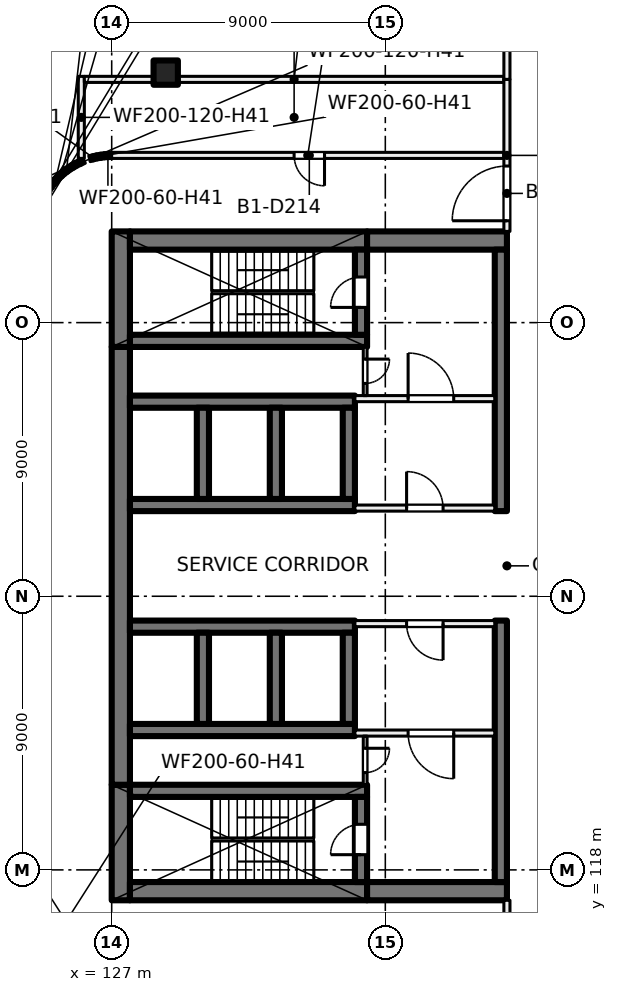
"""IFC4 building model, lengths in metres.
Left out: names, types, materials, properties, quantities, classifications, styles, units other than length and angle.
Written with IfcOpenShell. Run it as: python <this file> out.ifc"""

import sys

from ifc_helpers import new_model, si_unit, direction, frame, frame_2d, origin, origin_2d, place, context, subcontext, project, spatial, rectangle, extrude, element, fill, save


model = new_model("IFC4")
c1 = context("Model", 3, precision=1e-05, world=origin(), true_north=direction((0.0, 1.0)))
c2 = subcontext(c1, "Body", "Model", "MODEL_VIEW")
j1 = project(units=[si_unit("LENGTHUNIT", "METRE"), si_unit("PLANEANGLEUNIT", "RADIAN")], contexts=[c1])
p1 = place(None, origin())
s1 = spatial("IfcSite", under=j1, at=p1, CompositionType="ELEMENT")
p2 = place(p1, origin())
s2 = spatial("IfcBuilding", under=s1, at=p2, CompositionType="ELEMENT")
p3 = place(p2, frame((0.0, 0.0, -4.5)))
s3 = spatial("IfcBuildingStorey", under=s2, at=p3, CompositionType="ELEMENT", Elevation=-4.5)
p4 = place(p3, frame((128.777, 144.223, 0.0), z_axis=(0.0, 0.0, 1.0), x_axis=(1.0, 0.0, 0.0)))
e1 = element("IfcColumn", 1, at=p4, inside=s3, PredefinedType="COLUMN", context=c2, shape_type="SweptSolid", body=[
    extrude(rectangle(XDim=0.8, YDim=0.8, at=origin_2d()), origin(), (0.0, 0.0, 1.0), 4.5),
])
p5 = place(p3, frame((127.3, 117.0, 0.0), z_axis=(0.0, 0.0, 1.0), x_axis=(0.0, 1.0, 0.0)))
e2 = element("IfcWall", 2, at=p5, inside=s3, PredefinedType="SHEAR", context=c2, shape_type="SweptSolid", body=[
    extrude(rectangle(XDim=3.8, YDim=0.6, at=frame_2d((1.9, 0.0))), origin(), (0.0, 0.0, 1.0), 4.5),
])
p6 = place(p3, frame((127.3, 120.8, 0.0), z_axis=(0.0, 0.0, 1.0), x_axis=(0.0, 1.0, 0.0)))
e3 = element("IfcWall", 3, at=p6, inside=s3, PredefinedType="SHEAR", context=c2, shape_type="SweptSolid", body=[
    extrude(rectangle(XDim=14.4, YDim=0.6, at=frame_2d((7.2, 0.0))), origin(), (0.0, 0.0, 1.0), 4.5),
])
p7 = place(p3, frame((127.3, 135.2, 0.0), z_axis=(0.0, 0.0, 1.0), x_axis=(0.0, 1.0, 0.0)))
e4 = element("IfcWall", 4, at=p7, inside=s3, PredefinedType="SHEAR", context=c2, shape_type="SweptSolid", body=[
    extrude(rectangle(XDim=3.8, YDim=0.6, at=frame_2d((1.9, 0.0))), origin(), (0.0, 0.0, 1.0), 4.5),
])
for number, where, z_axis, x_axis in (
    (5, (127.6, 117.3, 0.0), (0.0, 0.0, 1.0), (1.0, 0.0, 0.0)),
    (6, (127.6, 138.7, 0.0), (0.0, 0.0, 1.0), (1.0, 0.0, 0.0)),
):
    element("IfcWall", number, at=place(p3, frame(where, z_axis=z_axis, x_axis=x_axis)), inside=s3, PredefinedType="SHEAR", context=c2, shape_type="SweptSolid", body=[
        extrude(rectangle(XDim=7.8, YDim=0.6, at=frame_2d((3.9, 0.0))), origin(), (0.0, 0.0, 1.0), 4.5),
    ])
for number, where, z_axis, x_axis in (
    (7, (135.4, 117.3, 0.0), (0.0, 0.0, 1.0), (1.0, 0.0, 0.0)),
    (8, (135.4, 138.7, 0.0), (0.0, 0.0, 1.0), (1.0, 0.0, 0.0)),
):
    element("IfcWall", number, at=place(p3, frame(where, z_axis=z_axis, x_axis=x_axis)), inside=s3, PredefinedType="SHEAR", context=c2, shape_type="SweptSolid", body=[
        extrude(rectangle(XDim=4.6, YDim=0.6, at=frame_2d((2.3, 0.0))), origin(), (0.0, 0.0, 1.0), 4.5),
    ])
p8 = place(p3, frame((127.6, 120.6, 0.0), z_axis=(0.0, 0.0, 1.0), x_axis=(1.0, 0.0, 0.0)))
e9 = element("IfcWall", 9, at=p8, inside=s3, PredefinedType="SHEAR", context=c2, shape_type="SweptSolid", body=[
    extrude(rectangle(XDim=7.8, YDim=0.4, at=frame_2d((3.9, 0.0))), origin(), (0.0, 0.0, 1.0), 4.5),
])
p9 = place(p3, frame((135.2, 117.6, 0.0), z_axis=(0.0, 0.0, 1.0), x_axis=(0.0, 1.0, 0.0)))
e10 = element("IfcWall", 10, at=p9, inside=s3, PredefinedType="SHEAR", context=c2, shape_type="SweptSolid", body=[
    extrude(rectangle(XDim=2.8, YDim=0.4, at=frame_2d((1.4, 0.0))), origin(), (0.0, 0.0, 1.0), 4.5),
])
p10 = place(p9, frame((0.9, 0.0, 0.0)))
e11 = element("IfcOpeningElement", 11, at=p10, cuts=e10, PredefinedType="OPENING", context=c2, shape_type="SweptSolid", body=[
    extrude(rectangle(XDim=1.0, YDim=2.1, at=frame_2d((0.5, 1.05))), frame((0.0, 0.21, 0.0), z_axis=(0.0, -1.0, 0.0), x_axis=(1.0, 0.0, 0.0)), (0.0, 0.0, 1.0), 0.42),
])
p11 = place(p3, frame((127.6, 135.4, 0.0), z_axis=(0.0, 0.0, 1.0), x_axis=(1.0, 0.0, 0.0)))
e12 = element("IfcWall", 12, at=p11, inside=s3, PredefinedType="SHEAR", context=c2, shape_type="SweptSolid", body=[
    extrude(rectangle(XDim=7.8, YDim=0.4, at=frame_2d((3.9, 0.0))), origin(), (0.0, 0.0, 1.0), 4.5),
])
p12 = place(p3, frame((135.2, 135.6, 0.0), z_axis=(0.0, 0.0, 1.0), x_axis=(0.0, 1.0, 0.0)))
e13 = element("IfcWall", 13, at=p12, inside=s3, PredefinedType="SHEAR", context=c2, shape_type="SweptSolid", body=[
    extrude(rectangle(XDim=2.8, YDim=0.4, at=frame_2d((1.4, 0.0))), origin(), (0.0, 0.0, 1.0), 4.5),
])
p13 = place(p12, frame((0.9, 0.0, 0.0)))
e14 = element("IfcOpeningElement", 14, at=p13, cuts=e13, PredefinedType="OPENING", context=c2, shape_type="SweptSolid", body=[
    extrude(rectangle(XDim=1.0, YDim=2.1, at=frame_2d((0.5, 1.05))), frame((0.0, 0.21, 0.0), z_axis=(0.0, -1.0, 0.0), x_axis=(1.0, 0.0, 0.0)), (0.0, 0.0, 1.0), 0.42),
])
for number, where, z_axis, x_axis in (
    (15, (127.6, 126.0, 0.0), (0.0, 0.0, 1.0), (1.0, 0.0, 0.0)),
    (16, (127.6, 122.6, 0.0), (0.0, 0.0, 1.0), (1.0, 0.0, 0.0)),
):
    element("IfcWall", number, at=place(p3, frame(where, z_axis=z_axis, x_axis=x_axis)), inside=s3, PredefinedType="SHEAR", context=c2, shape_type="SweptSolid", body=[
        extrude(rectangle(XDim=7.4, YDim=0.4, at=frame_2d((3.7, 0.0))), origin(), (0.0, 0.0, 1.0), 4.5),
    ])
for number, where, z_axis, x_axis in (
    (17, (130.0, 122.8, 0.0), (0.0, 0.0, 1.0), (0.0, 1.0, 0.0)),
    (18, (132.4, 122.8, 0.0), (0.0, 0.0, 1.0), (0.0, 1.0, 0.0)),
    (19, (134.8, 122.8, 0.0), (0.0, 0.0, 1.0), (0.0, 1.0, 0.0)),
):
    element("IfcWall", number, at=place(p3, frame(where, z_axis=z_axis, x_axis=x_axis)), inside=s3, PredefinedType="SHEAR", context=c2, shape_type="SweptSolid", body=[
        extrude(rectangle(XDim=3.0, YDim=0.4, at=frame_2d((1.5, 0.0))), origin(), (0.0, 0.0, 1.0), 4.5),
    ])
for number, where, z_axis, x_axis in (
    (20, (127.6, 130.0, 0.0), (0.0, 0.0, 1.0), (1.0, 0.0, 0.0)),
    (21, (127.6, 133.4, 0.0), (0.0, 0.0, 1.0), (1.0, 0.0, 0.0)),
):
    element("IfcWall", number, at=place(p3, frame(where, z_axis=z_axis, x_axis=x_axis)), inside=s3, PredefinedType="SHEAR", context=c2, shape_type="SweptSolid", body=[
        extrude(rectangle(XDim=7.4, YDim=0.4, at=frame_2d((3.7, 0.0))), origin(), (0.0, 0.0, 1.0), 4.5),
    ])
for number, where, z_axis, x_axis in (
    (22, (130.0, 130.2, 0.0), (0.0, 0.0, 1.0), (0.0, 1.0, 0.0)),
    (23, (132.4, 130.2, 0.0), (0.0, 0.0, 1.0), (0.0, 1.0, 0.0)),
    (24, (134.8, 130.2, 0.0), (0.0, 0.0, 1.0), (0.0, 1.0, 0.0)),
):
    element("IfcWall", number, at=place(p3, frame(where, z_axis=z_axis, x_axis=x_axis)), inside=s3, PredefinedType="SHEAR", context=c2, shape_type="SweptSolid", body=[
        extrude(rectangle(XDim=3.0, YDim=0.4, at=frame_2d((1.5, 0.0))), origin(), (0.0, 0.0, 1.0), 4.5),
    ])
for number, where, z_axis, x_axis in (
    (25, (139.8, 117.6, 0.0), (0.0, 0.0, 1.0), (0.0, 1.0, 0.0)),
    (26, (139.8, 129.8, 0.0), (0.0, 0.0, 1.0), (0.0, 1.0, 0.0)),
):
    element("IfcWall", number, at=place(p3, frame(where, z_axis=z_axis, x_axis=x_axis)), inside=s3, PredefinedType="SHEAR", context=c2, shape_type="SweptSolid", body=[
        extrude(rectangle(XDim=8.6, YDim=0.4, at=frame_2d((4.3, 0.0))), origin(), (0.0, 0.0, 1.0), 4.5),
    ])
p14 = place(p3, frame((135.0, 129.9, 0.0), z_axis=(0.0, 0.0, 1.0), x_axis=(1.0, 0.0, 0.0)))
e27 = element("IfcWall", 27, at=p14, inside=s3, PredefinedType="PARTITIONING", context=c2, shape_type="SweptSolid", body=[
    extrude(rectangle(XDim=4.6, YDim=0.2, at=frame_2d((2.3, 0.0))), origin(), (0.0, 0.0, 1.0), 4.1),
])
p15 = place(p14, frame((1.7, 0.0, 0.0)))
e28 = element("IfcOpeningElement", 28, at=p15, cuts=e27, PredefinedType="OPENING", context=c2, shape_type="SweptSolid", body=[
    extrude(rectangle(XDim=1.2, YDim=2.1, at=frame_2d((0.6, 1.05))), frame((0.0, 0.11, 0.0), z_axis=(0.0, -1.0, 0.0), x_axis=(1.0, 0.0, 0.0)), (0.0, 0.0, 1.0), 0.22),
])
p16 = place(p3, frame((135.0, 133.5, 0.0), z_axis=(0.0, 0.0, 1.0), x_axis=(1.0, 0.0, 0.0)))
e29 = element("IfcWall", 29, at=p16, inside=s3, PredefinedType="PARTITIONING", context=c2, shape_type="SweptSolid", body=[
    extrude(rectangle(XDim=4.6, YDim=0.2, at=frame_2d((2.3, 0.0))), origin(), (0.0, 0.0, 1.0), 4.1),
])
p17 = place(p16, frame((1.75, 0.0, 0.0)))
e30 = element("IfcOpeningElement", 30, at=p17, cuts=e29, PredefinedType="OPENING", context=c2, shape_type="SweptSolid", body=[
    extrude(rectangle(XDim=1.5, YDim=2.1, at=frame_2d((0.75, 1.05))), frame((0.0, 0.11, 0.0), z_axis=(0.0, -1.0, 0.0), x_axis=(1.0, 0.0, 0.0)), (0.0, 0.0, 1.0), 0.22),
])
p18 = place(p3, frame((135.337, 135.2, 0.0), z_axis=(0.0, 0.0, 1.0), x_axis=(0.0, -1.0, 0.0)))
e31 = element("IfcWall", 31, at=p18, inside=s3, PredefinedType="PARTITIONING", context=c2, shape_type="SweptSolid", body=[
    extrude(rectangle(XDim=1.6, YDim=0.125, at=frame_2d((0.8, 0.0))), origin(), (0.0, 0.0, 1.0), 4.1),
])
p19 = place(p18, frame((0.4, 0.0, 0.0)))
e32 = element("IfcOpeningElement", 32, at=p19, cuts=e31, PredefinedType="OPENING", context=c2, shape_type="SweptSolid", body=[
    extrude(rectangle(XDim=0.8, YDim=2.1, at=frame_2d((0.4, 1.05))), frame((0.0, 0.073, 0.0), z_axis=(0.0, -1.0, 0.0), x_axis=(1.0, 0.0, 0.0)), (0.0, 0.0, 1.0), 0.145),
])
p20 = place(p3, frame((139.6, 126.1, 0.0), z_axis=(0.0, 0.0, 1.0), x_axis=(-1.0, 0.0, 0.0)))
e33 = element("IfcWall", 33, at=p20, inside=s3, PredefinedType="PARTITIONING", context=c2, shape_type="SweptSolid", body=[
    extrude(rectangle(XDim=4.6, YDim=0.2, at=frame_2d((2.3, 0.0))), origin(), (0.0, 0.0, 1.0), 4.1),
])
p21 = place(p20, frame((1.7, 0.0, 0.0)))
e34 = element("IfcOpeningElement", 34, at=p21, cuts=e33, PredefinedType="OPENING", context=c2, shape_type="SweptSolid", body=[
    extrude(rectangle(XDim=1.2, YDim=2.1, at=frame_2d((0.6, 1.05))), frame((0.0, 0.11, 0.0), z_axis=(0.0, -1.0, 0.0), x_axis=(1.0, 0.0, 0.0)), (0.0, 0.0, 1.0), 0.22),
])
p22 = place(p3, frame((139.6, 122.5, 0.0), z_axis=(0.0, 0.0, 1.0), x_axis=(-1.0, 0.0, 0.0)))
e35 = element("IfcWall", 35, at=p22, inside=s3, PredefinedType="PARTITIONING", context=c2, shape_type="SweptSolid", body=[
    extrude(rectangle(XDim=4.6, YDim=0.2, at=frame_2d((2.3, 0.0))), origin(), (0.0, 0.0, 1.0), 4.1),
])
p23 = place(p22, frame((1.35, 0.0, 0.0)))
e36 = element("IfcOpeningElement", 36, at=p23, cuts=e35, PredefinedType="OPENING", context=c2, shape_type="SweptSolid", body=[
    extrude(rectangle(XDim=1.5, YDim=2.1, at=frame_2d((0.75, 1.05))), frame((0.0, 0.11, 0.0), z_axis=(0.0, -1.0, 0.0), x_axis=(1.0, 0.0, 0.0)), (0.0, 0.0, 1.0), 0.22),
])
p24 = place(p3, frame((135.337, 122.4, 0.0), z_axis=(0.0, 0.0, 1.0), x_axis=(0.0, -1.0, 0.0)))
e37 = element("IfcWall", 37, at=p24, inside=s3, PredefinedType="PARTITIONING", context=c2, shape_type="SweptSolid", body=[
    extrude(rectangle(XDim=1.6, YDim=0.125, at=frame_2d((0.8, 0.0))), origin(), (0.0, 0.0, 1.0), 4.1),
])
p25 = place(p24, frame((0.4, 0.0, 0.0)))
e38 = element("IfcOpeningElement", 38, at=p25, cuts=e37, PredefinedType="OPENING", context=c2, shape_type="SweptSolid", body=[
    extrude(rectangle(XDim=0.8, YDim=2.1, at=frame_2d((0.4, 1.05))), frame((0.0, 0.073, 0.0), z_axis=(0.0, -1.0, 0.0), x_axis=(1.0, 0.0, 0.0)), (0.0, 0.0, 1.0), 0.145),
])
p26 = place(p3, frame((124.918, 140.385, 0.0), z_axis=(0.0, 0.0, 1.0), x_axis=(0.595707657713, 0.803201336243, 0.0)))
e39 = element("IfcWall", 39, at=p26, inside=s3, PredefinedType="PARTITIONING", context=c2, shape_type="SweptSolid", body=[
    extrude(rectangle(XDim=0.255, YDim=0.2, at=frame_2d((0.128, 0.0))), origin(), (0.0, 0.0, 1.0), 4.1),
])
for number, where, z_axis, x_axis in (
    (40, (125.064, 140.582, 0.0), (0.0, 0.0, 1.0), (0.669, 0.743, 0.0)),
    (41, (125.228, 140.765, 0.0), (0.0, 0.0, 1.0), (0.743, 0.669, 0.0)),
):
    element("IfcWall", number, at=place(p3, frame(where, z_axis=z_axis, x_axis=x_axis)), inside=s3, PredefinedType="PARTITIONING", context=c2, shape_type="SweptSolid", body=[
        extrude(rectangle(XDim=0.256, YDim=0.2, at=frame_2d((0.128, 0.0))), origin(), (0.0, 0.0, 1.0), 4.1),
    ])
p27 = place(p3, frame((125.41, 140.93, 0.0), z_axis=(0.0, 0.0, 1.0), x_axis=(0.803201336243, 0.595707657713, 0.0)))
e42 = element("IfcWall", 42, at=p27, inside=s3, PredefinedType="PARTITIONING", context=c2, shape_type="SweptSolid", body=[
    extrude(rectangle(XDim=0.255, YDim=0.2, at=frame_2d((0.128, 0.0))), origin(), (0.0, 0.0, 1.0), 4.1),
])
p28 = place(p3, frame((125.607, 141.076, 0.0), z_axis=(0.0, 0.0, 1.0), x_axis=(0.857998903579, 0.513651517527, 0.0)))
e43 = element("IfcWall", 43, at=p28, inside=s3, PredefinedType="PARTITIONING", context=c2, shape_type="SweptSolid", body=[
    extrude(rectangle(XDim=0.255, YDim=0.2, at=frame_2d((0.127, 0.0))), origin(), (0.0, 0.0, 1.0), 4.1),
])
p29 = place(p3, frame((125.818, 141.203, 0.0), z_axis=(0.0, 0.0, 1.0), x_axis=(0.902065692634, 0.431598755991, 0.0)))
e44 = element("IfcWall", 44, at=p29, inside=s3, PredefinedType="PARTITIONING", context=c2, shape_type="SweptSolid", body=[
    extrude(rectangle(XDim=0.302, YDim=0.2, at=frame_2d((0.151, 0.0))), origin(), (0.0, 0.0, 1.0), 4.1),
])
p30 = place(p3, frame((126.0, 141.401, 0.0), z_axis=(0.0, 0.0, 1.0), x_axis=(0.0, 1.0, 0.0)))
e45 = element("IfcWall", 45, at=p30, inside=s3, PredefinedType="PARTITIONING", context=c2, shape_type="SweptSolid", body=[
    extrude(rectangle(XDim=2.699, YDim=0.2, at=frame_2d((1.35, 0.0))), origin(), (0.0, 0.0, 1.0), 4.1),
])
p31 = place(p3, frame((126.1, 144.0, 0.0), z_axis=(0.0, 0.0, 1.0), x_axis=(1.0, 0.0, 0.0)))
e46 = element("IfcWall", 46, at=p31, inside=s3, PredefinedType="PARTITIONING", context=c2, shape_type="SweptSolid", body=[
    extrude(rectangle(XDim=13.8, YDim=0.2, at=frame_2d((6.9, 0.0))), origin(), (0.0, 0.0, 1.0), 4.1),
])
p32 = place(p3, frame((126.269, 141.391, 0.0), z_axis=(0.0, 0.0, 1.0), x_axis=(0.970366809683, 0.241636616978, 0.0)))
e47 = element("IfcWall", 47, at=p32, inside=s3, PredefinedType="PARTITIONING", context=c2, shape_type="SweptSolid", body=[
    extrude(rectangle(XDim=0.256, YDim=0.2, at=frame_2d((0.128, 0.0))), origin(), (0.0, 0.0, 1.0), 4.1),
])
p33 = place(p3, frame((126.507, 141.451, 0.0), z_axis=(0.0, 0.0, 1.0), x_axis=(0.988852180426, 0.148900521377, 0.0)))
e48 = element("IfcWall", 48, at=p33, inside=s3, PredefinedType="PARTITIONING", context=c2, shape_type="SweptSolid", body=[
    extrude(rectangle(XDim=0.256, YDim=0.2, at=frame_2d((0.128, 0.0))), origin(), (0.0, 0.0, 1.0), 4.1),
])
p34 = place(p3, frame((126.75, 141.488, 0.0), z_axis=(0.0, 0.0, 1.0), x_axis=(0.998874697667, 0.047427190102, 0.0)))
e49 = element("IfcWall", 49, at=p34, inside=s3, PredefinedType="PARTITIONING", context=c2, shape_type="SweptSolid", body=[
    extrude(rectangle(XDim=0.252, YDim=0.2, at=frame_2d((0.126, 0.0))), origin(), (0.0, 0.0, 1.0), 4.1),
])
p35 = place(p3, frame((126.998, 141.5, 0.0), z_axis=(0.0, 0.0, 1.0), x_axis=(1.0, 0.0, 0.0)))
e50 = element("IfcWall", 50, at=p35, inside=s3, PredefinedType="PARTITIONING", context=c2, shape_type="SweptSolid", body=[
    extrude(rectangle(XDim=12.902, YDim=0.2, at=frame_2d((6.451, 0.0))), origin(), (0.0, 0.0, 1.0), 4.1),
])
p36 = place(p35, frame((6.002, 0.0, 0.0)))
e51 = element("IfcOpeningElement", 51, at=p36, cuts=e50, PredefinedType="OPENING", context=c2, shape_type="SweptSolid", body=[
    extrude(rectangle(XDim=1.0, YDim=2.1, at=frame_2d((0.5, 1.05))), frame((0.0, 0.11, 0.0), z_axis=(0.0, -1.0, 0.0), x_axis=(1.0, 0.0, 0.0)), (0.0, 0.0, 1.0), 0.22),
])
p37 = place(p3, frame((140.0, 103.9, 0.0), z_axis=(0.0, 0.0, 1.0), x_axis=(0.0, 1.0, 0.0)))
e52 = element("IfcWall", 52, at=p37, inside=s3, PredefinedType="PARTITIONING", context=c2, shape_type="SweptSolid", body=[
    extrude(rectangle(XDim=13.1, YDim=0.2, at=frame_2d((6.55, 0.0))), origin(), (0.0, 0.0, 1.0), 4.1),
])
p38 = place(p3, frame((140.0, 139.0, 0.0), z_axis=(0.0, 0.0, 1.0), x_axis=(0.0, 1.0, 0.0)))
e53 = element("IfcWall", 53, at=p38, inside=s3, PredefinedType="PARTITIONING", context=c2, shape_type="SweptSolid", body=[
    extrude(rectangle(XDim=5.0, YDim=0.2, at=frame_2d((2.5, 0.0))), origin(), (0.0, 0.0, 1.0), 4.1),
])
p39 = place(p38, frame((0.35, 0.0, 0.0)))
e54 = element("IfcOpeningElement", 54, at=p39, cuts=e53, PredefinedType="OPENING", context=c2, shape_type="SweptSolid", body=[
    extrude(rectangle(XDim=1.8, YDim=2.1, at=frame_2d((0.9, 1.05))), frame((0.0, 0.11, 0.0), z_axis=(0.0, -1.0, 0.0), x_axis=(1.0, 0.0, 0.0)), (0.0, 0.0, 1.0), 0.22),
])
p40 = place(p3, frame((140.0, 144.0, 0.0), z_axis=(0.0, 0.0, 1.0), x_axis=(0.0, 1.0, 0.0)))
e55 = element("IfcWall", 55, at=p40, inside=s3, PredefinedType="PARTITIONING", context=c2, shape_type="SweptSolid", body=[
    extrude(rectangle(XDim=8.1, YDim=0.2, at=frame_2d((4.05, 0.0))), origin(), (0.0, 0.0, 1.0), 4.1),
])
p41 = place(p15, origin())
e56 = element("IfcDoor", 56, at=p41, inside=s3, OperationType="DOUBLE_DOOR_SINGLE_SWING", PredefinedType="DOOR", context=c2, shape_type="SweptSolid", body=[
    extrude(rectangle(XDim=1.2, YDim=2.1, at=frame_2d((0.6, 1.05))), frame((0.0, 0.025, 0.0), z_axis=(0.0, -1.0, 0.0), x_axis=(1.0, 0.0, 0.0)), (0.0, 0.0, 1.0), 0.05),
])
fill(e28, e56)
p42 = place(p17, origin())
e57 = element("IfcDoor", 57, at=p42, inside=s3, OperationType="DOUBLE_DOOR_SINGLE_SWING", PredefinedType="DOOR", context=c2, shape_type="SweptSolid", body=[
    extrude(rectangle(XDim=1.5, YDim=2.1, at=frame_2d((0.75, 1.05))), frame((0.0, 0.025, 0.0), z_axis=(0.0, -1.0, 0.0), x_axis=(1.0, 0.0, 0.0)), (0.0, 0.0, 1.0), 0.05),
])
fill(e30, e57)
p43 = place(p13, origin())
e58 = element("IfcDoor", 58, at=p43, inside=s3, OperationType="SINGLE_SWING_LEFT", PredefinedType="DOOR", context=c2, shape_type="SweptSolid", body=[
    extrude(rectangle(XDim=1.0, YDim=2.1, at=frame_2d((0.5, 1.05))), frame((0.0, 0.025, 0.0), z_axis=(0.0, -1.0, 0.0), x_axis=(1.0, 0.0, 0.0)), (0.0, 0.0, 1.0), 0.05),
])
fill(e14, e58)
p44 = place(p19, origin())
e59 = element("IfcDoor", 59, at=p44, inside=s3, OperationType="SINGLE_SWING_RIGHT", PredefinedType="DOOR", context=c2, shape_type="SweptSolid", body=[
    extrude(rectangle(XDim=0.8, YDim=2.1, at=frame_2d((0.4, 1.05))), frame((0.0, 0.025, 0.0), z_axis=(0.0, -1.0, 0.0), x_axis=(1.0, 0.0, 0.0)), (0.0, 0.0, 1.0), 0.05),
])
fill(e32, e59)
p45 = place(p21, origin())
e60 = element("IfcDoor", 60, at=p45, inside=s3, OperationType="DOUBLE_DOOR_SINGLE_SWING", PredefinedType="DOOR", context=c2, shape_type="SweptSolid", body=[
    extrude(rectangle(XDim=1.2, YDim=2.1, at=frame_2d((0.6, 1.05))), frame((0.0, 0.025, 0.0), z_axis=(0.0, -1.0, 0.0), x_axis=(1.0, 0.0, 0.0)), (0.0, 0.0, 1.0), 0.05),
])
fill(e34, e60)
p46 = place(p23, origin())
e61 = element("IfcDoor", 61, at=p46, inside=s3, OperationType="DOUBLE_DOOR_SINGLE_SWING", PredefinedType="DOOR", context=c2, shape_type="SweptSolid", body=[
    extrude(rectangle(XDim=1.5, YDim=2.1, at=frame_2d((0.75, 1.05))), frame((0.0, 0.025, 0.0), z_axis=(0.0, -1.0, 0.0), x_axis=(1.0, 0.0, 0.0)), (0.0, 0.0, 1.0), 0.05),
])
fill(e36, e61)
p47 = place(p10, origin())
e62 = element("IfcDoor", 62, at=p47, inside=s3, OperationType="SINGLE_SWING_RIGHT", PredefinedType="DOOR", context=c2, shape_type="SweptSolid", body=[
    extrude(rectangle(XDim=1.0, YDim=2.1, at=frame_2d((0.5, 1.05))), frame((0.0, 0.025, 0.0), z_axis=(0.0, -1.0, 0.0), x_axis=(1.0, 0.0, 0.0)), (0.0, 0.0, 1.0), 0.05),
])
fill(e11, e62)
p48 = place(p25, origin())
e63 = element("IfcDoor", 63, at=p48, inside=s3, OperationType="SINGLE_SWING_LEFT", PredefinedType="DOOR", context=c2, shape_type="SweptSolid", body=[
    extrude(rectangle(XDim=0.8, YDim=2.1, at=frame_2d((0.4, 1.05))), frame((0.0, 0.025, 0.0), z_axis=(0.0, -1.0, 0.0), x_axis=(1.0, 0.0, 0.0)), (0.0, 0.0, 1.0), 0.05),
])
fill(e38, e63)
p49 = place(p36, origin())
e64 = element("IfcDoor", 64, at=p49, inside=s3, OperationType="SINGLE_SWING_RIGHT", PredefinedType="DOOR", context=c2, shape_type="SweptSolid", body=[
    extrude(rectangle(XDim=1.0, YDim=2.1, at=frame_2d((0.5, 1.05))), frame((0.0, 0.025, 0.0), z_axis=(0.0, -1.0, 0.0), x_axis=(1.0, 0.0, 0.0)), (0.0, 0.0, 1.0), 0.05),
])
fill(e51, e64)
p50 = place(p39, origin())
e65 = element("IfcDoor", 65, at=p50, inside=s3, OperationType="DOUBLE_DOOR_SINGLE_SWING", PredefinedType="DOOR", context=c2, shape_type="SweptSolid", body=[
    extrude(rectangle(XDim=1.8, YDim=2.1, at=frame_2d((0.9, 1.05))), frame((0.0, 0.025, 0.0), z_axis=(0.0, -1.0, 0.0), x_axis=(1.0, 0.0, 0.0)), (0.0, 0.0, 1.0), 0.05),
])
fill(e54, e65)
save(model, sys.argv[1])
